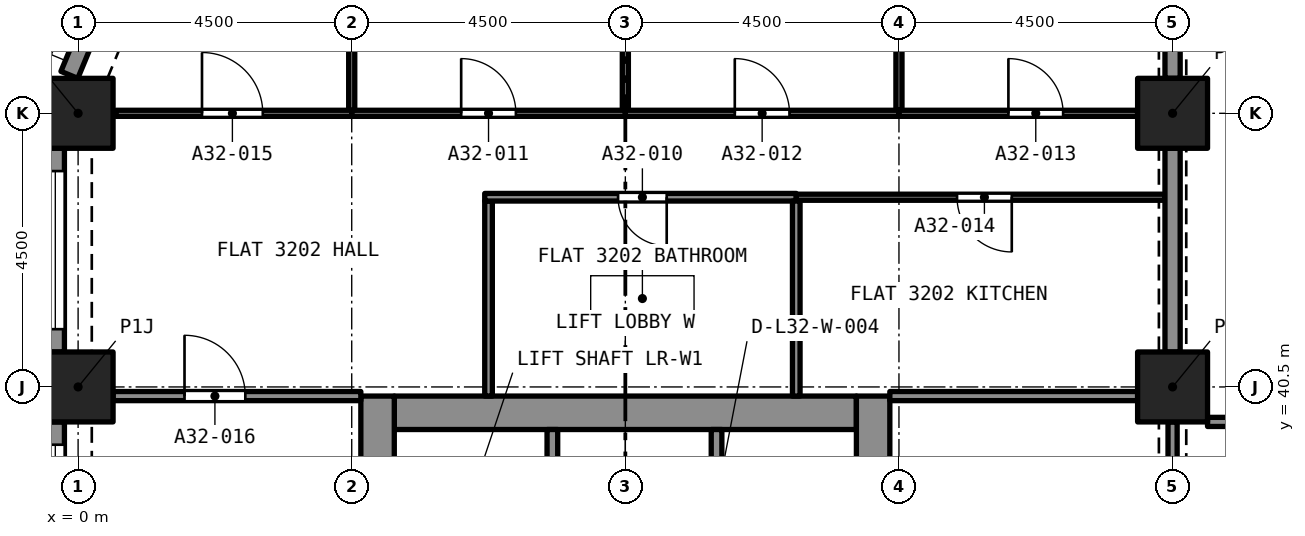
"""IFC4 building model, lengths in metres.
Left out: names, types, materials, properties, quantities, classifications, styles, units other than length and angle.
Written with IfcOpenShell. Run it as: python <this file> out.ifc"""

import sys

from ifc_helpers import new_model, si_unit, direction, frame, frame_2d, origin, origin_2d, place, context, subcontext, project, spatial, rectangle, extrude, element, fill, save


model = new_model("IFC4")
c1 = context("Model", 3, precision=1e-05, world=origin(), true_north=direction((0.0, 1.0)))
c2 = subcontext(c1, "Body", "Model", "MODEL_VIEW")
j1 = project(units=[si_unit("LENGTHUNIT", "METRE"), si_unit("PLANEANGLEUNIT", "RADIAN")], contexts=[c1])
p1 = place(None, origin())
s1 = spatial("IfcSite", under=j1, at=p1, CompositionType="ELEMENT")
p2 = place(p1, origin())
s2 = spatial("IfcBuilding", under=s1, at=p2, CompositionType="ELEMENT")
p3 = place(p2, frame((0.0, 0.0, 115.2)))
s3 = spatial("IfcBuildingStorey", under=s2, at=p3, CompositionType="ELEMENT", Elevation=115.2)
for number, where, z_axis, x_axis in (
    (1, (0.0, 40.5, 0.0), (0.0, 0.0, 1.0), (1.0, 0.0, 0.0)),
    (2, (18.0, 40.5, 0.0), (0.0, 0.0, 1.0), (1.0, 0.0, 0.0)),
    (3, (0.0, 45.0, 0.0), (0.0, 0.0, 1.0), (1.0, 0.0, 0.0)),
    (4, (18.0, 45.0, 0.0), (0.0, 0.0, 1.0), (1.0, 0.0, 0.0)),
):
    element("IfcColumn", number, at=place(p3, frame(where, z_axis=z_axis, x_axis=x_axis)), inside=s3, PredefinedType="COLUMN", context=c2, shape_type="SweptSolid", body=[
        extrude(rectangle(XDim=1.15, YDim=1.15, at=origin_2d()), origin(), (0.0, 0.0, 1.0), 3.2),
    ])
p4 = place(p3, frame((5.2, 40.075, 0.0), z_axis=(0.0, 0.0, 1.0), x_axis=(1.0, 0.0, 0.0)))
e5 = element("IfcWall", 5, at=p4, inside=s3, PredefinedType="SOLIDWALL", context=c2, shape_type="SweptSolid", body=[
    extrude(rectangle(XDim=7.6, YDim=0.55, at=frame_2d((3.8, 0.0))), origin(), (0.0, 0.0, 1.0), 3.2),
])
p5 = place(p3, frame((4.925, 27.15, 0.0), z_axis=(0.0, 0.0, 1.0), x_axis=(0.0, 1.0, 0.0)))
e6 = element("IfcWall", 6, at=p5, inside=s3, PredefinedType="SOLIDWALL", context=c2, shape_type="SweptSolid", body=[
    extrude(rectangle(XDim=13.2, YDim=0.55, at=frame_2d((6.6, 0.0))), origin(), (0.0, 0.0, 1.0), 3.2),
])
p6 = place(p5, frame((8.8, 0.0, 0.0)))
e7 = element("IfcOpeningElement", 7, at=p6, cuts=e6, PredefinedType="OPENING", context=c2, shape_type="SweptSolid", body=[
    extrude(rectangle(XDim=1.2, YDim=2.1, at=frame_2d((0.6, 1.05))), frame((0.0, 0.285, 0.0), z_axis=(0.0, -1.0, 0.0), x_axis=(1.0, 0.0, 0.0)), (0.0, 0.0, 1.0), 0.57),
])
p7 = place(p3, frame((13.075, 27.15, 0.0), z_axis=(0.0, 0.0, 1.0), x_axis=(0.0, 1.0, 0.0)))
e8 = element("IfcWall", 8, at=p7, inside=s3, PredefinedType="SOLIDWALL", context=c2, shape_type="SweptSolid", body=[
    extrude(rectangle(XDim=13.2, YDim=0.55, at=frame_2d((6.6, 0.0))), origin(), (0.0, 0.0, 1.0), 3.2),
])
p8 = place(p7, frame((10.95, 0.0, 0.0)))
e9 = element("IfcOpeningElement", 9, at=p8, cuts=e8, PredefinedType="OPENING", context=c2, shape_type="SweptSolid", body=[
    extrude(rectangle(XDim=1.1, YDim=2.1, at=frame_2d((0.55, 1.05))), frame((0.0, 0.285, 0.0), z_axis=(0.0, -1.0, 0.0), x_axis=(1.0, 0.0, 0.0)), (0.0, 0.0, 1.0), 0.57),
])
p9 = place(p7, frame((8.8, 0.0, 0.0)))
e10 = element("IfcOpeningElement", 10, at=p9, cuts=e8, PredefinedType="OPENING", context=c2, shape_type="SweptSolid", body=[
    extrude(rectangle(XDim=1.2, YDim=2.1, at=frame_2d((0.6, 1.05))), frame((0.0, 0.285, 0.0), z_axis=(0.0, -1.0, 0.0), x_axis=(1.0, 0.0, 0.0)), (0.0, 0.0, 1.0), 0.57),
])
p10 = place(p3, frame((-0.144, 45.632, 0.0), z_axis=(0.0, 0.0, 1.0), x_axis=(0.382723818695, 0.923862802911, 0.0)))
e11 = element("IfcWall", 11, at=p10, inside=s3, PredefinedType="SOLIDWALL", context=c2, shape_type="SweptSolid", body=[
    extrude(rectangle(XDim=2.164, YDim=0.3, at=frame_2d((1.082, 0.0))), origin(), (0.0, 0.0, 1.0), 3.2),
])
p11 = place(p10, frame((0.493, 0.0, 0.45)))
e12 = element("IfcOpeningElement", 12, at=p11, cuts=e11, PredefinedType="OPENING", context=c2, shape_type="SweptSolid", body=[
    extrude(rectangle(XDim=1.4, YDim=1.95, at=frame_2d((0.7, 0.975))), frame((0.0, 0.16, 0.0), z_axis=(0.0, -1.0, 0.0), x_axis=(1.0, 0.0, 0.0)), (0.0, 0.0, 1.0), 0.32),
])
p12 = place(p3, frame((-0.375, 41.075, 0.0), z_axis=(0.0, 0.0, 1.0), x_axis=(0.0, 1.0, 0.0)))
e13 = element("IfcWall", 13, at=p12, inside=s3, PredefinedType="SOLIDWALL", context=c2, shape_type="SweptSolid", body=[
    extrude(rectangle(XDim=3.35, YDim=0.3, at=frame_2d((1.675, 0.0))), origin(), (0.0, 0.0, 1.0), 3.2),
])
p13 = place(p12, frame((0.375, 0.0, 0.45)))
e14 = element("IfcOpeningElement", 14, at=p13, cuts=e13, PredefinedType="OPENING", context=c2, shape_type="SweptSolid", body=[
    extrude(rectangle(XDim=2.6, YDim=1.95, at=frame_2d((1.3, 0.975))), frame((0.0, 0.16, 0.0), z_axis=(0.0, -1.0, 0.0), x_axis=(1.0, 0.0, 0.0)), (0.0, 0.0, 1.0), 0.32),
])
p14 = place(p3, frame((-0.375, 36.575, 0.0), z_axis=(0.0, 0.0, 1.0), x_axis=(0.0, 1.0, 0.0)))
e15 = element("IfcWall", 15, at=p14, inside=s3, PredefinedType="SOLIDWALL", context=c2, shape_type="SweptSolid", body=[
    extrude(rectangle(XDim=3.35, YDim=0.3, at=frame_2d((1.675, 0.0))), origin(), (0.0, 0.0, 1.0), 3.2),
])
p15 = place(p14, frame((0.375, 0.0, 0.45)))
e16 = element("IfcOpeningElement", 16, at=p15, cuts=e15, PredefinedType="OPENING", context=c2, shape_type="SweptSolid", body=[
    extrude(rectangle(XDim=2.6, YDim=1.95, at=frame_2d((1.3, 0.975))), frame((0.0, 0.16, 0.0), z_axis=(0.0, -1.0, 0.0), x_axis=(1.0, 0.0, 0.0)), (0.0, 0.0, 1.0), 0.32),
])
p16 = place(p3, frame((6.75, 40.35, 0.0), z_axis=(0.0, 0.0, 1.0), x_axis=(0.0, 1.0, 0.0)))
e17 = element("IfcWall", 17, at=p16, inside=s3, PredefinedType="PARTITIONING", context=c2, shape_type="SweptSolid", body=[
    extrude(rectangle(XDim=3.208, YDim=0.125, at=frame_2d((1.604, 0.0))), origin(), (0.0, 0.0, 1.0), 2.9),
])
p17 = place(p3, frame((11.811, 43.62, 0.0), z_axis=(0.0, 0.0, 1.0), x_axis=(-1.0, 0.0, 0.0)))
e18 = element("IfcWall", 18, at=p17, inside=s3, PredefinedType="PARTITIONING", context=c2, shape_type="SweptSolid", body=[
    extrude(rectangle(XDim=5.123, YDim=0.125, at=frame_2d((2.562, 0.0))), origin(), (0.0, 0.0, 1.0), 2.9),
])
p18 = place(p17, frame((2.13, 0.0, 0.0)))
e19 = element("IfcOpeningElement", 19, at=p18, cuts=e18, PredefinedType="OPENING", context=c2, shape_type="SweptSolid", body=[
    extrude(rectangle(XDim=0.8, YDim=2.1, at=frame_2d((0.4, 1.05))), frame((0.0, 0.073, 0.0), z_axis=(0.0, -1.0, 0.0), x_axis=(1.0, 0.0, 0.0)), (0.0, 0.0, 1.0), 0.145),
])
p19 = place(p3, frame((11.811, 40.35, 0.0), z_axis=(0.0, 0.0, 1.0), x_axis=(0.0, 1.0, 0.0)))
e20 = element("IfcWall", 20, at=p19, inside=s3, PredefinedType="PARTITIONING", context=c2, shape_type="SweptSolid", body=[
    extrude(rectangle(XDim=3.208, YDim=0.125, at=frame_2d((1.604, 0.0))), origin(), (0.0, 0.0, 1.0), 2.9),
])
p20 = place(p3, frame((9.0, 45.05, 0.0), z_axis=(0.0, 0.0, 1.0), x_axis=(0.0, 1.0, 0.0)))
e21 = element("IfcWall", 21, at=p20, inside=s3, PredefinedType="PARTITIONING", context=c2, shape_type="SweptSolid", body=[
    extrude(rectangle(XDim=3.875, YDim=0.1, at=frame_2d((1.938, 0.0))), origin(), (0.0, 0.0, 1.0), 2.9),
])
p21 = place(p3, frame((4.5, 45.0, 0.0), z_axis=(0.0, 0.0, 1.0), x_axis=(1.0, 0.0, 0.0)))
e22 = element("IfcWall", 22, at=p21, inside=s3, PredefinedType="PARTITIONING", context=c2, shape_type="SweptSolid", body=[
    extrude(rectangle(XDim=4.5, YDim=0.1, at=frame_2d((2.25, 0.0))), origin(), (0.0, 0.0, 1.0), 2.9),
])
p22 = place(p21, frame((1.8, 0.0, 0.0)))
e23 = element("IfcOpeningElement", 23, at=p22, cuts=e22, PredefinedType="OPENING", context=c2, shape_type="SweptSolid", body=[
    extrude(rectangle(XDim=0.9, YDim=2.1, at=frame_2d((0.45, 1.05))), frame((0.0, 0.06, 0.0), z_axis=(0.0, -1.0, 0.0), x_axis=(1.0, 0.0, 0.0)), (0.0, 0.0, 1.0), 0.12),
])
p23 = place(p3, frame((4.5, 45.05, 0.0), z_axis=(0.0, 0.0, 1.0), x_axis=(0.0, 1.0, 0.0)))
e24 = element("IfcWall", 24, at=p23, inside=s3, PredefinedType="PARTITIONING", context=c2, shape_type="SweptSolid", body=[
    extrude(rectangle(XDim=3.828, YDim=0.1, at=frame_2d((1.914, 0.0))), origin(), (0.0, 0.0, 1.0), 2.9),
])
p24 = place(p3, frame((13.5, 45.05, 0.0), z_axis=(0.0, 0.0, 1.0), x_axis=(0.0, 1.0, 0.0)))
e25 = element("IfcWall", 25, at=p24, inside=s3, PredefinedType="PARTITIONING", context=c2, shape_type="SweptSolid", body=[
    extrude(rectangle(XDim=3.875, YDim=0.1, at=frame_2d((1.938, 0.0))), origin(), (0.0, 0.0, 1.0), 2.9),
])
p25 = place(p3, frame((9.0, 45.0, 0.0), z_axis=(0.0, 0.0, 1.0), x_axis=(1.0, 0.0, 0.0)))
e26 = element("IfcWall", 26, at=p25, inside=s3, PredefinedType="PARTITIONING", context=c2, shape_type="SweptSolid", body=[
    extrude(rectangle(XDim=4.5, YDim=0.1, at=frame_2d((2.25, 0.0))), origin(), (0.0, 0.0, 1.0), 2.9),
])
p26 = place(p25, frame((1.8, 0.0, 0.0)))
e27 = element("IfcOpeningElement", 27, at=p26, cuts=e26, PredefinedType="OPENING", context=c2, shape_type="SweptSolid", body=[
    extrude(rectangle(XDim=0.9, YDim=2.1, at=frame_2d((0.45, 1.05))), frame((0.0, 0.06, 0.0), z_axis=(0.0, -1.0, 0.0), x_axis=(1.0, 0.0, 0.0)), (0.0, 0.0, 1.0), 0.12),
])
p27 = place(p3, frame((13.5, 45.0, 0.0), z_axis=(0.0, 0.0, 1.0), x_axis=(1.0, 0.0, 0.0)))
e28 = element("IfcWall", 28, at=p27, inside=s3, PredefinedType="PARTITIONING", context=c2, shape_type="SweptSolid", body=[
    extrude(rectangle(XDim=3.925, YDim=0.1, at=frame_2d((1.962, 0.0))), origin(), (0.0, 0.0, 1.0), 2.9),
])
p28 = place(p27, frame((1.8, 0.0, 0.0)))
e29 = element("IfcOpeningElement", 29, at=p28, cuts=e28, PredefinedType="OPENING", context=c2, shape_type="SweptSolid", body=[
    extrude(rectangle(XDim=0.9, YDim=2.1, at=frame_2d((0.45, 1.05))), frame((0.0, 0.06, 0.0), z_axis=(0.0, -1.0, 0.0), x_axis=(1.0, 0.0, 0.0)), (0.0, 0.0, 1.0), 0.12),
])
p29 = place(p3, frame((18.0, 45.575, 0.0), z_axis=(0.0, 0.0, 1.0), x_axis=(0.0, 1.0, 0.0)))
e30 = element("IfcWall", 30, at=p29, inside=s3, PredefinedType="PARTITIONING", context=c2, shape_type="SweptSolid", body=[
    extrude(rectangle(XDim=3.35, YDim=0.25, at=frame_2d((1.675, 0.0))), origin(), (0.0, 0.0, 1.0), 2.38),
])
p30 = place(p3, frame((17.875, 43.62, 0.0), z_axis=(0.0, 0.0, 1.0), x_axis=(-1.0, 0.0, 0.0)))
e31 = element("IfcWall", 31, at=p30, inside=s3, PredefinedType="PARTITIONING", context=c2, shape_type="SweptSolid", body=[
    extrude(rectangle(XDim=6.064, YDim=0.1, at=frame_2d((3.032, 0.0))), origin(), (0.0, 0.0, 1.0), 2.9),
])
p31 = place(p30, frame((2.52, 0.0, 0.0)))
e32 = element("IfcOpeningElement", 32, at=p31, cuts=e31, PredefinedType="OPENING", context=c2, shape_type="SweptSolid", body=[
    extrude(rectangle(XDim=0.9, YDim=2.1, at=frame_2d((0.45, 1.05))), frame((0.0, 0.06, 0.0), z_axis=(0.0, -1.0, 0.0), x_axis=(1.0, 0.0, 0.0)), (0.0, 0.0, 1.0), 0.12),
])
p32 = place(p3, frame((0.622, 45.0, 0.0), z_axis=(0.0, 0.0, 1.0), x_axis=(1.0, 0.0, 0.0)))
e33 = element("IfcWall", 33, at=p32, inside=s3, PredefinedType="PARTITIONING", context=c2, shape_type="SweptSolid", body=[
    extrude(rectangle(XDim=3.878, YDim=0.1, at=frame_2d((1.939, 0.0))), origin(), (0.0, 0.0, 1.0), 2.9),
])
p33 = place(p32, frame((1.415, 0.0, 0.0)))
e34 = element("IfcOpeningElement", 34, at=p33, cuts=e33, PredefinedType="OPENING", context=c2, shape_type="SweptSolid", body=[
    extrude(rectangle(XDim=1.0, YDim=2.1, at=frame_2d((0.5, 1.05))), frame((0.0, 0.06, 0.0), z_axis=(0.0, -1.0, 0.0), x_axis=(1.0, 0.0, 0.0)), (0.0, 0.0, 1.0), 0.12),
])
p34 = place(p3, frame((0.575, 40.35, 0.0), z_axis=(0.0, 0.0, 1.0), x_axis=(1.0, 0.0, 0.0)))
e35 = element("IfcWall", 35, at=p34, inside=s3, PredefinedType="PARTITIONING", context=c2, shape_type="SweptSolid", body=[
    extrude(rectangle(XDim=4.075, YDim=0.15, at=frame_2d((2.038, 0.0))), origin(), (0.0, 0.0, 1.0), 2.9),
])
p35 = place(p34, frame((1.175, 0.0, 0.0)))
e36 = element("IfcOpeningElement", 36, at=p35, cuts=e35, PredefinedType="OPENING", context=c2, shape_type="SweptSolid", body=[
    extrude(rectangle(XDim=1.0, YDim=2.1, at=frame_2d((0.5, 1.05))), frame((0.0, 0.085, 0.0), z_axis=(0.0, -1.0, 0.0), x_axis=(1.0, 0.0, 0.0)), (0.0, 0.0, 1.0), 0.17),
])
p36 = place(p3, frame((18.0, 41.075, 0.0), z_axis=(0.0, 0.0, 1.0), x_axis=(0.0, 1.0, 0.0)))
e37 = element("IfcWall", 37, at=p36, inside=s3, PredefinedType="PARTITIONING", context=c2, shape_type="SweptSolid", body=[
    extrude(rectangle(XDim=3.35, YDim=0.25, at=frame_2d((1.675, 0.0))), origin(), (0.0, 0.0, 1.0), 2.38),
])
p37 = place(p3, frame((13.35, 40.35, 0.0), z_axis=(0.0, 0.0, 1.0), x_axis=(1.0, 0.0, 0.0)))
e38 = element("IfcWall", 38, at=p37, inside=s3, PredefinedType="PARTITIONING", context=c2, shape_type="SweptSolid", body=[
    extrude(rectangle(XDim=4.075, YDim=0.15, at=frame_2d((2.038, 0.0))), origin(), (0.0, 0.0, 1.0), 2.9),
])
p38 = place(p3, frame((18.575, 39.925, 0.0), z_axis=(0.0, 0.0, 1.0), x_axis=(1.0, 0.0, 0.0)))
e39 = element("IfcWall", 39, at=p38, inside=s3, PredefinedType="PARTITIONING", context=c2, shape_type="SweptSolid", body=[
    extrude(rectangle(XDim=8.425, YDim=0.15, at=frame_2d((4.212, 0.0))), origin(), (0.0, 0.0, 1.0), 2.75),
])
p39 = place(p38, frame((3.425, 0.0, 0.0)))
e40 = element("IfcOpeningElement", 40, at=p39, cuts=e39, PredefinedType="OPENING", context=c2, shape_type="SweptSolid", body=[
    extrude(rectangle(XDim=1.0, YDim=2.1, at=frame_2d((0.5, 1.05))), frame((0.0, 0.085, 0.0), z_axis=(0.0, -1.0, 0.0), x_axis=(1.0, 0.0, 0.0)), (0.0, 0.0, 1.0), 0.17),
])
p40 = place(p3, frame((18.0, 39.925, 0.0), z_axis=(0.0, 0.0, 1.0), x_axis=(0.0, -1.0, 0.0)))
e41 = element("IfcWall", 41, at=p40, inside=s3, PredefinedType="PARTITIONING", context=c2, shape_type="SweptSolid", body=[
    extrude(rectangle(XDim=3.35, YDim=0.15, at=frame_2d((1.675, 0.0))), origin(), (0.0, 0.0, 1.0), 2.38),
])
p41 = place(p40, frame((1.075, 0.0, 0.0)))
e42 = element("IfcOpeningElement", 42, at=p41, cuts=e41, PredefinedType="OPENING", context=c2, shape_type="SweptSolid", body=[
    extrude(rectangle(XDim=1.2, YDim=2.1, at=frame_2d((0.6, 1.05))), frame((0.0, 0.085, 0.0), z_axis=(0.0, -1.0, 0.0), x_axis=(1.0, 0.0, 0.0)), (0.0, 0.0, 1.0), 0.17),
])
p42 = place(p3, frame((7.8, 37.5, 0.0), z_axis=(0.0, 0.0, 1.0), x_axis=(0.0, 1.0, 0.0)))
e43 = element("IfcWall", 43, at=p42, inside=s3, PredefinedType="SOLIDWALL", context=c2, shape_type="SweptSolid", body=[
    extrude(rectangle(XDim=2.3, YDim=0.175, at=frame_2d((1.15, 0.0))), origin(), (0.0, 0.0, 1.0), 2.9),
])
p43 = place(p3, frame((10.5, 37.5, 0.0), z_axis=(0.0, 0.0, 1.0), x_axis=(0.0, 1.0, 0.0)))
e44 = element("IfcWall", 44, at=p43, inside=s3, PredefinedType="SOLIDWALL", context=c2, shape_type="SweptSolid", body=[
    extrude(rectangle(XDim=2.3, YDim=0.175, at=frame_2d((1.15, 0.0))), origin(), (0.0, 0.0, 1.0), 2.9),
])
p44 = place(p43, frame((0.65, 0.0, 0.0)))
e45 = element("IfcOpeningElement", 45, at=p44, cuts=e44, PredefinedType="OPENING", context=c2, shape_type="SweptSolid", body=[
    extrude(rectangle(XDim=1.0, YDim=2.1, at=frame_2d((0.5, 1.05))), frame((0.0, 0.097, 0.0), z_axis=(0.0, -1.0, 0.0), x_axis=(1.0, 0.0, 0.0)), (0.0, 0.0, 1.0), 0.195),
])
p45 = place(p13, origin())
e46 = element("IfcWindow", 46, at=p45, inside=s3, PartitioningType="SINGLE_PANEL", PredefinedType="WINDOW", context=c2, shape_type="SweptSolid", body=[
    extrude(rectangle(XDim=2.6, YDim=1.95, at=frame_2d((1.3, 0.975))), frame((0.0, 0.03, 0.0), z_axis=(0.0, -1.0, 0.0), x_axis=(1.0, 0.0, 0.0)), (0.0, 0.0, 1.0), 0.06),
])
fill(e14, e46)
p46 = place(p15, origin())
e47 = element("IfcWindow", 47, at=p46, inside=s3, PartitioningType="SINGLE_PANEL", PredefinedType="WINDOW", context=c2, shape_type="SweptSolid", body=[
    extrude(rectangle(XDim=2.6, YDim=1.95, at=frame_2d((1.3, 0.975))), frame((0.0, 0.03, 0.0), z_axis=(0.0, -1.0, 0.0), x_axis=(1.0, 0.0, 0.0)), (0.0, 0.0, 1.0), 0.06),
])
fill(e16, e47)
p47 = place(p18, origin())
e48 = element("IfcDoor", 48, at=p47, inside=s3, OperationType="SINGLE_SWING_LEFT", PredefinedType="DOOR", context=c2, shape_type="SweptSolid", body=[
    extrude(rectangle(XDim=0.8, YDim=2.1, at=frame_2d((0.4, 1.05))), frame((0.0, 0.025, 0.0), z_axis=(0.0, -1.0, 0.0), x_axis=(1.0, 0.0, 0.0)), (0.0, 0.0, 1.0), 0.05),
])
fill(e19, e48)
p48 = place(p22, origin())
e49 = element("IfcDoor", 49, at=p48, inside=s3, OperationType="SINGLE_SWING_RIGHT", PredefinedType="DOOR", context=c2, shape_type="SweptSolid", body=[
    extrude(rectangle(XDim=0.9, YDim=2.1, at=frame_2d((0.45, 1.05))), frame((0.0, 0.025, 0.0), z_axis=(0.0, -1.0, 0.0), x_axis=(1.0, 0.0, 0.0)), (0.0, 0.0, 1.0), 0.05),
])
fill(e23, e49)
p49 = place(p26, origin())
e50 = element("IfcDoor", 50, at=p49, inside=s3, OperationType="SINGLE_SWING_LEFT", PredefinedType="DOOR", context=c2, shape_type="SweptSolid", body=[
    extrude(rectangle(XDim=0.9, YDim=2.1, at=frame_2d((0.45, 1.05))), frame((0.0, 0.025, 0.0), z_axis=(0.0, -1.0, 0.0), x_axis=(1.0, 0.0, 0.0)), (0.0, 0.0, 1.0), 0.05),
])
fill(e27, e50)
p50 = place(p28, origin())
e51 = element("IfcDoor", 51, at=p50, inside=s3, OperationType="SINGLE_SWING_RIGHT", PredefinedType="DOOR", context=c2, shape_type="SweptSolid", body=[
    extrude(rectangle(XDim=0.9, YDim=2.1, at=frame_2d((0.45, 1.05))), frame((0.0, 0.025, 0.0), z_axis=(0.0, -1.0, 0.0), x_axis=(1.0, 0.0, 0.0)), (0.0, 0.0, 1.0), 0.05),
])
fill(e29, e51)
p51 = place(p31, origin())
e52 = element("IfcDoor", 52, at=p51, inside=s3, OperationType="SINGLE_SWING_LEFT", PredefinedType="DOOR", context=c2, shape_type="SweptSolid", body=[
    extrude(rectangle(XDim=0.9, YDim=2.1, at=frame_2d((0.45, 1.05))), frame((0.0, 0.025, 0.0), z_axis=(0.0, -1.0, 0.0), x_axis=(1.0, 0.0, 0.0)), (0.0, 0.0, 1.0), 0.05),
])
fill(e32, e52)
p52 = place(p33, origin())
e53 = element("IfcDoor", 53, at=p52, inside=s3, OperationType="SINGLE_SWING_LEFT", PredefinedType="DOOR", context=c2, shape_type="SweptSolid", body=[
    extrude(rectangle(XDim=1.0, YDim=2.1, at=frame_2d((0.5, 1.05))), frame((0.0, 0.025, 0.0), z_axis=(0.0, -1.0, 0.0), x_axis=(1.0, 0.0, 0.0)), (0.0, 0.0, 1.0), 0.05),
])
fill(e34, e53)
p53 = place(p35, origin())
e54 = element("IfcDoor", 54, at=p53, inside=s3, OperationType="SINGLE_SWING_LEFT", PredefinedType="DOOR", context=c2, shape_type="SweptSolid", body=[
    extrude(rectangle(XDim=1.0, YDim=2.1, at=frame_2d((0.5, 1.05))), frame((0.0, 0.025, 0.0), z_axis=(0.0, -1.0, 0.0), x_axis=(1.0, 0.0, 0.0)), (0.0, 0.0, 1.0), 0.05),
])
fill(e36, e54)
save(model, sys.argv[1])
